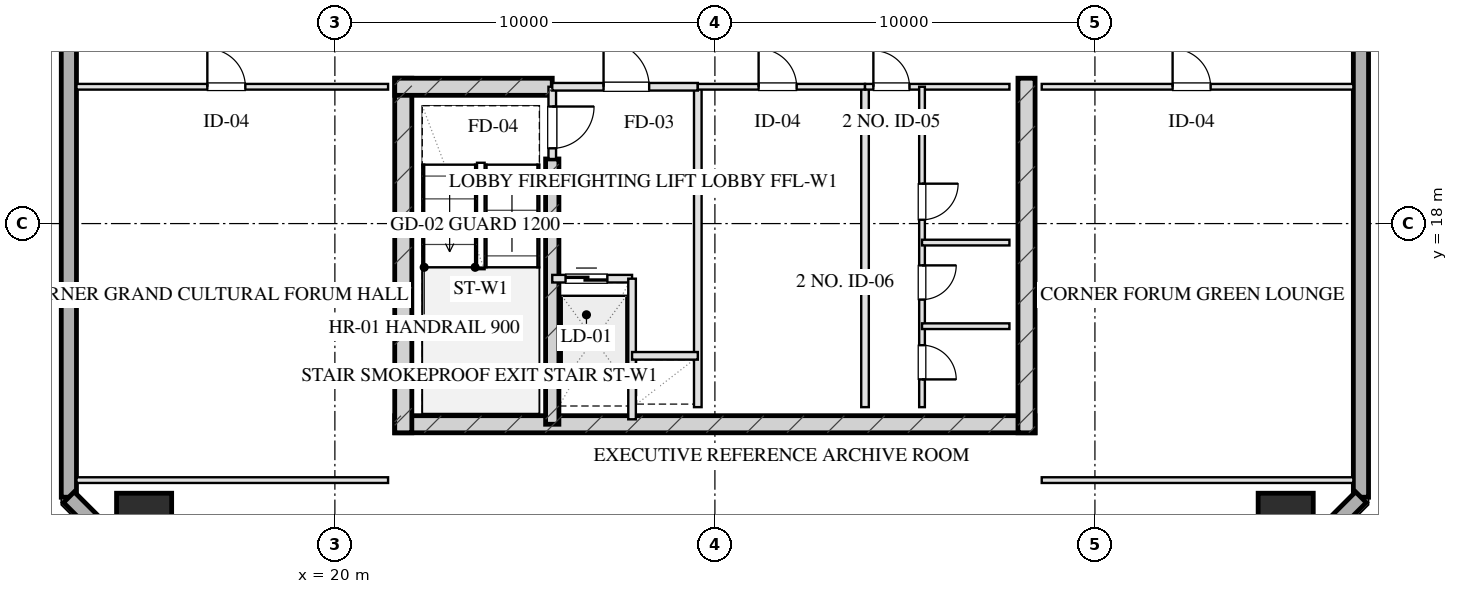
"""IFC4 building model, lengths in metres.
Left out: names, types, materials, properties, quantities, classifications, styles, units other than length and angle.
Written with IfcOpenShell. Run it as: python <this file> out.ifc"""

import sys

from ifc_helpers import new_model, si_unit, direction, frame, frame_2d, origin, origin_2d, place, context, subcontext, project, spatial, rectangle, hollow_rectangle, extrude, element, fill, save


model = new_model("IFC4")
c1 = context("Model", 3, precision=1e-05, world=origin(), true_north=direction((0.0, 1.0)))
c2 = subcontext(c1, "Body", "Model", "MODEL_VIEW")
j1 = project(units=[si_unit("LENGTHUNIT", "METRE"), si_unit("PLANEANGLEUNIT", "RADIAN")], contexts=[c1])
p1 = place(None, origin())
s1 = spatial("IfcSite", under=j1, at=p1, CompositionType="ELEMENT")
p2 = place(p1, origin())
s2 = spatial("IfcBuilding", under=s1, at=p2, CompositionType="ELEMENT")
p3 = place(p2, frame((0.0, 0.0, 205.85)))
s3 = spatial("IfcBuildingStorey", under=s2, at=p3, CompositionType="ELEMENT", Elevation=205.85)
p4 = place(p3, frame((21.575, 12.72, 0.0), z_axis=(0.0, 0.0, 1.0), x_axis=(1.0, 0.0, 0.0)))
e1 = element("IfcWall", 1, at=p4, inside=s3, PredefinedType="SHEAR", context=c2, shape_type="SweptSolid", body=[
    extrude(rectangle(XDim=16.85, YDim=0.45, at=frame_2d((8.425, 0.0))), origin(), (0.0, 0.0, 1.0), 3.45),
])
for number, where, z_axis, x_axis in (
    (2, (21.8, 21.825, 0.0), (0.0, 0.0, 1.0), (0.0, -1.0, 0.0)),
    (3, (38.2, 21.825, 0.0), (0.0, 0.0, 1.0), (0.0, -1.0, 0.0)),
):
    element("IfcWall", number, at=place(p3, frame(where, z_axis=z_axis, x_axis=x_axis)), inside=s3, PredefinedType="SHEAR", context=c2, shape_type="SweptSolid", body=[
        extrude(rectangle(XDim=9.33, YDim=0.45, at=frame_2d((4.665, 0.0))), origin(), (0.0, 0.0, 1.0), 3.45),
    ])
p5 = place(p3, frame((25.72, 19.7, 0.0), z_axis=(0.0, 0.0, 1.0), x_axis=(0.0, -1.0, 0.0)))
e4 = element("IfcWall", 4, at=p5, inside=s3, PredefinedType="SHEAR", context=c2, shape_type="SweptSolid", body=[
    extrude(rectangle(XDim=6.98, YDim=0.35, at=frame_2d((3.49, 0.0))), origin(), (0.0, 0.0, 1.0), 3.45),
])
p6 = place(p3, frame((21.575, 21.6, 0.0), z_axis=(0.0, 0.0, 1.0), x_axis=(1.0, 0.0, 0.0)))
e5 = element("IfcWall", 5, at=p6, inside=s3, PredefinedType="SHEAR", context=c2, shape_type="SweptSolid", body=[
    extrude(rectangle(XDim=4.145, YDim=0.45, at=frame_2d((2.073, 0.0))), origin(), (0.0, 0.0, 1.0), 3.45),
])
for number, where, z_axis, x_axis in (
    (6, (14.98, 10.18, 0.0), (0.0, 0.0, 1.0), (1.0, 0.0, 0.0)),
    (7, (45.02, 10.18, 0.0), (0.0, 0.0, 1.0), (1.0, 0.0, 0.0)),
):
    element("IfcColumn", number, at=place(p3, frame(where, z_axis=z_axis, x_axis=x_axis)), inside=s3, PredefinedType="COLUMN", context=c2, shape_type="SweptSolid", body=[
        extrude(hollow_rectangle(XDim=1.45, YDim=1.45, WallThickness=0.05, at=origin_2d()), origin(), (0.0, 0.0, 1.0), 3.451),
    ])
p7 = place(p3, frame((13.0, 10.8, 0.0), z_axis=(0.0, 0.0, 1.0), x_axis=(0.0, 1.0, 0.0)))
e8 = element("IfcWall", 8, at=p7, inside=s3, PredefinedType="SOLIDWALL", context=c2, shape_type="SweptSolid", body=[
    extrude(rectangle(XDim=46.4, YDim=0.4, at=frame_2d((23.2, 0.0))), origin(), (0.0, 0.0, 1.0), 2.61),
])
p8 = place(p7, frame((15.75, 0.0, 0.75)))
e9 = element("IfcOpeningElement", 9, at=p8, cuts=e8, PredefinedType="OPENING", context=c2, shape_type="SweptSolid", body=[
    extrude(rectangle(XDim=2.1, YDim=1.46, at=frame_2d((1.05, 0.73))), frame((0.0, 0.21, 0.0), z_axis=(0.0, -1.0, 0.0), x_axis=(1.0, 0.0, 0.0)), (0.0, 0.0, 1.0), 0.42),
])
p9 = place(p7, frame((19.55, 0.0, 0.75)))
e10 = element("IfcOpeningElement", 10, at=p9, cuts=e8, PredefinedType="OPENING", context=c2, shape_type="SweptSolid", body=[
    extrude(rectangle(XDim=2.1, YDim=1.46, at=frame_2d((1.05, 0.73))), frame((0.0, 0.21, 0.0), z_axis=(0.0, -1.0, 0.0), x_axis=(1.0, 0.0, 0.0)), (0.0, 0.0, 1.0), 0.42),
])
p10 = place(p7, frame((27.05, 0.0, 0.0)))
e11 = element("IfcOpeningElement", 11, at=p10, cuts=e8, PredefinedType="OPENING", context=c2, shape_type="SweptSolid", body=[
    extrude(rectangle(XDim=1.1, YDim=2.15, at=frame_2d((0.55, 1.075))), frame((0.0, 0.21, 0.0), z_axis=(0.0, -1.0, 0.0), x_axis=(1.0, 0.0, 0.0)), (0.0, 0.0, 1.0), 0.42),
])
p11 = place(p3, frame((47.0, 57.2, 0.0), z_axis=(0.0, 0.0, 1.0), x_axis=(0.0, -1.0, 0.0)))
e12 = element("IfcWall", 12, at=p11, inside=s3, PredefinedType="SOLIDWALL", context=c2, shape_type="SweptSolid", body=[
    extrude(rectangle(XDim=46.4, YDim=0.4, at=frame_2d((23.2, 0.0))), origin(), (0.0, 0.0, 1.0), 2.61),
])
p12 = place(p11, frame((28.55, 0.0, 0.75)))
e13 = element("IfcOpeningElement", 13, at=p12, cuts=e12, PredefinedType="OPENING", context=c2, shape_type="SweptSolid", body=[
    extrude(rectangle(XDim=2.1, YDim=1.46, at=frame_2d((1.05, 0.73))), frame((0.0, 0.21, 0.0), z_axis=(0.0, -1.0, 0.0), x_axis=(1.0, 0.0, 0.0)), (0.0, 0.0, 1.0), 0.42),
])
p13 = place(p11, frame((24.75, 0.0, 0.75)))
e14 = element("IfcOpeningElement", 14, at=p13, cuts=e12, PredefinedType="OPENING", context=c2, shape_type="SweptSolid", body=[
    extrude(rectangle(XDim=2.1, YDim=1.46, at=frame_2d((1.05, 0.73))), frame((0.0, 0.21, 0.0), z_axis=(0.0, -1.0, 0.0), x_axis=(1.0, 0.0, 0.0)), (0.0, 0.0, 1.0), 0.42),
])
p14 = place(p11, frame((16.667, 0.0, 0.0)))
e15 = element("IfcOpeningElement", 15, at=p14, cuts=e12, PredefinedType="OPENING", context=c2, shape_type="SweptSolid", body=[
    extrude(rectangle(XDim=1.1, YDim=2.15, at=frame_2d((0.55, 1.075))), frame((0.0, 0.21, 0.0), z_axis=(0.0, -1.0, 0.0), x_axis=(1.0, 0.0, 0.0)), (0.0, 0.0, 1.0), 0.42),
])
for number, where, z_axis, x_axis in (
    (16, (47.0, 10.8, 0.0), (0.0, 0.0, 1.0), (-0.707, -0.707, 0.0)),
    (17, (15.6, 8.2, 0.0), (0.0, 0.0, 1.0), (-0.707, 0.707, 0.0)),
):
    element("IfcWall", number, at=place(p3, frame(where, z_axis=z_axis, x_axis=x_axis)), inside=s3, PredefinedType="SOLIDWALL", context=c2, shape_type="SweptSolid", body=[
        extrude(rectangle(XDim=3.677, YDim=0.4, at=frame_2d((1.838, 0.0))), origin(), (0.0, 0.0, 1.0), 2.61),
    ])
p15 = place(p3, frame((25.72, 21.6, 0.0), z_axis=(0.0, 0.0, 1.0), x_axis=(0.0, -1.0, 0.0)))
e18 = element("IfcWall", 18, at=p15, inside=s3, PredefinedType="PARTITIONING", context=c2, shape_type="SweptSolid", body=[
    extrude(rectangle(XDim=1.9, YDim=0.2, at=frame_2d((0.95, 0.0))), origin(), (0.0, 0.0, 1.0), 3.175),
])
p16 = place(p15, frame((0.52, 0.0, 0.0)))
e19 = element("IfcOpeningElement", 19, at=p16, cuts=e18, PredefinedType="OPENING", context=c2, shape_type="SweptSolid", body=[
    extrude(rectangle(XDim=1.1, YDim=2.05, at=frame_2d((0.55, 1.025))), frame((0.0, 0.11, 0.0), z_axis=(0.0, -1.0, 0.0), x_axis=(1.0, 0.0, 0.0)), (0.0, 0.0, 1.0), 0.22),
])
p17 = place(p3, frame((29.55, 21.6, 0.0), z_axis=(0.0, 0.0, 1.0), x_axis=(0.0, -1.0, 0.0)))
e20 = element("IfcWall", 20, at=p17, inside=s3, PredefinedType="PARTITIONING", context=c2, shape_type="SweptSolid", body=[
    extrude(rectangle(XDim=8.43, YDim=0.2, at=frame_2d((4.215, 0.0))), origin(), (0.0, 0.0, 1.0), 3.175),
])
p18 = place(p3, frame((25.72, 21.6, 0.0), z_axis=(0.0, 0.0, 1.0), x_axis=(1.0, 0.0, 0.0)))
e21 = element("IfcWall", 21, at=p18, inside=s3, PredefinedType="PARTITIONING", context=c2, shape_type="SweptSolid", body=[
    extrude(rectangle(XDim=3.83, YDim=0.2, at=frame_2d((1.915, 0.0))), origin(), (0.0, 0.0, 1.0), 3.175),
])
p19 = place(p18, frame((1.35, 0.0, 0.0)))
e22 = element("IfcOpeningElement", 22, at=p19, cuts=e21, PredefinedType="OPENING", context=c2, shape_type="SweptSolid", body=[
    extrude(rectangle(XDim=1.2, YDim=2.05, at=frame_2d((0.6, 1.025))), frame((0.0, 0.11, 0.0), z_axis=(0.0, -1.0, 0.0), x_axis=(1.0, 0.0, 0.0)), (0.0, 0.0, 1.0), 0.22),
])
p20 = place(p3, frame((25.72, 16.55, 0.0), z_axis=(0.0, 0.0, 1.0), x_axis=(1.0, 0.0, 0.0)))
e23 = element("IfcWall", 23, at=p20, inside=s3, PredefinedType="PARTITIONING", context=c2, shape_type="SweptSolid", body=[
    extrude(rectangle(XDim=2.1, YDim=0.2, at=frame_2d((1.05, 0.0))), origin(), (0.0, 0.0, 1.0), 3.175),
])
p21 = place(p20, frame((0.35, 0.0, 0.0)))
e24 = element("IfcOpeningElement", 24, at=p21, cuts=e23, PredefinedType="OPENING", context=c2, shape_type="SweptSolid", body=[
    extrude(rectangle(XDim=1.1, YDim=2.05, at=frame_2d((0.55, 1.025))), frame((0.0, 0.11, 0.0), z_axis=(0.0, -1.0, 0.0), x_axis=(1.0, 0.0, 0.0)), (0.0, 0.0, 1.0), 0.22),
])
p22 = place(p3, frame((27.82, 16.55, 0.0), z_axis=(0.0, 0.0, 1.0), x_axis=(0.0, -1.0, 0.0)))
e25 = element("IfcWall", 25, at=p22, inside=s3, PredefinedType="PARTITIONING", context=c2, shape_type="SweptSolid", body=[
    extrude(rectangle(XDim=3.7, YDim=0.2, at=frame_2d((1.85, 0.0))), origin(), (0.0, 0.0, 1.0), 3.175),
])
p23 = place(p3, frame((27.82, 14.52, 0.0), z_axis=(0.0, 0.0, 1.0), x_axis=(1.0, 0.0, 0.0)))
e26 = element("IfcWall", 26, at=p23, inside=s3, PredefinedType="PARTITIONING", context=c2, shape_type="SweptSolid", body=[
    extrude(rectangle(XDim=1.73, YDim=0.2, at=frame_2d((0.865, 0.0))), origin(), (0.0, 0.0, 1.0), 3.175),
])
p24 = place(p3, frame((33.95, 21.6, 0.0), z_axis=(0.0, 0.0, 1.0), x_axis=(0.0, -1.0, 0.0)))
e27 = element("IfcWall", 27, at=p24, inside=s3, PredefinedType="PARTITIONING", context=c2, shape_type="SweptSolid", body=[
    extrude(rectangle(XDim=8.43, YDim=0.2, at=frame_2d((4.215, 0.0))), origin(), (0.0, 0.0, 1.0), 3.175),
])
p25 = place(p3, frame((29.55, 21.6, 0.0), z_axis=(0.0, 0.0, 1.0), x_axis=(1.0, 0.0, 0.0)))
e28 = element("IfcWall", 28, at=p25, inside=s3, PredefinedType="PARTITIONING", context=c2, shape_type="SweptSolid", body=[
    extrude(rectangle(XDim=4.4, YDim=0.15, at=frame_2d((2.2, 0.0))), origin(), (0.0, 0.0, 1.0), 3.175),
])
p26 = place(p25, frame((1.6, 0.0, 0.0)))
e29 = element("IfcOpeningElement", 29, at=p26, cuts=e28, PredefinedType="OPENING", context=c2, shape_type="SweptSolid", body=[
    extrude(rectangle(XDim=1.0, YDim=2.05, at=frame_2d((0.5, 1.025))), frame((0.0, 0.085, 0.0), z_axis=(0.0, -1.0, 0.0), x_axis=(1.0, 0.0, 0.0)), (0.0, 0.0, 1.0), 0.17),
])
p27 = place(p3, frame((33.95, 21.6, 0.0), z_axis=(0.0, 0.0, 1.0), x_axis=(1.0, 0.0, 0.0)))
e30 = element("IfcWall", 30, at=p27, inside=s3, PredefinedType="PARTITIONING", context=c2, shape_type="SweptSolid", body=[
    extrude(rectangle(XDim=3.8, YDim=0.15, at=frame_2d((1.9, 0.0))), origin(), (0.0, 0.0, 1.0), 3.175),
])
p28 = place(p27, frame((0.22, 0.0, 0.0)))
e31 = element("IfcOpeningElement", 31, at=p28, cuts=e30, PredefinedType="OPENING", context=c2, shape_type="SweptSolid", body=[
    extrude(rectangle(XDim=0.95, YDim=2.05, at=frame_2d((0.475, 1.025))), frame((0.0, 0.085, 0.0), z_axis=(0.0, -1.0, 0.0), x_axis=(1.0, 0.0, 0.0)), (0.0, 0.0, 1.0), 0.17),
])
p29 = place(p3, frame((35.45, 21.6, 0.0), z_axis=(0.0, 0.0, 1.0), x_axis=(0.0, -1.0, 0.0)))
e32 = element("IfcWall", 32, at=p29, inside=s3, PredefinedType="PARTITIONING", context=c2, shape_type="SweptSolid", body=[
    extrude(rectangle(XDim=8.43, YDim=0.15, at=frame_2d((4.215, 0.0))), origin(), (0.0, 0.0, 1.0), 2.815),
])
p30 = place(p29, frame((2.55, 0.0, 0.0)))
e33 = element("IfcOpeningElement", 33, at=p30, cuts=e32, PredefinedType="OPENING", context=c2, shape_type="SweptSolid", body=[
    extrude(rectangle(XDim=0.95, YDim=2.05, at=frame_2d((0.475, 1.025))), frame((0.0, 0.085, 0.0), z_axis=(0.0, -1.0, 0.0), x_axis=(1.0, 0.0, 0.0)), (0.0, 0.0, 1.0), 0.17),
])
p31 = place(p29, frame((4.7, 0.0, 0.0)))
e34 = element("IfcOpeningElement", 34, at=p31, cuts=e32, PredefinedType="OPENING", context=c2, shape_type="SweptSolid", body=[
    extrude(rectangle(XDim=0.9, YDim=2.05, at=frame_2d((0.45, 1.025))), frame((0.0, 0.085, 0.0), z_axis=(0.0, -1.0, 0.0), x_axis=(1.0, 0.0, 0.0)), (0.0, 0.0, 1.0), 0.17),
])
p32 = place(p29, frame((6.8, 0.0, 0.0)))
e35 = element("IfcOpeningElement", 35, at=p32, cuts=e32, PredefinedType="OPENING", context=c2, shape_type="SweptSolid", body=[
    extrude(rectangle(XDim=0.9, YDim=2.05, at=frame_2d((0.45, 1.025))), frame((0.0, 0.085, 0.0), z_axis=(0.0, -1.0, 0.0), x_axis=(1.0, 0.0, 0.0)), (0.0, 0.0, 1.0), 0.17),
])
for number, where, z_axis, x_axis in (
    (36, (35.45, 17.5, 0.0), (0.0, 0.0, 1.0), (1.0, 0.0, 0.0)),
    (37, (35.45, 15.3, 0.0), (0.0, 0.0, 1.0), (1.0, 0.0, 0.0)),
):
    element("IfcWall", number, at=place(p3, frame(where, z_axis=z_axis, x_axis=x_axis)), inside=s3, PredefinedType="PARTITIONING", context=c2, shape_type="SweptSolid", body=[
        extrude(rectangle(XDim=2.3, YDim=0.15, at=frame_2d((1.15, 0.0))), origin(), (0.0, 0.0, 1.0), 3.175),
    ])
p33 = place(p3, frame((13.2, 11.25, 0.0), z_axis=(0.0, 0.0, 1.0), x_axis=(1.0, 0.0, 0.0)))
e38 = element("IfcWall", 38, at=p33, inside=s3, PredefinedType="PARTITIONING", context=c2, shape_type="SweptSolid", body=[
    extrude(rectangle(XDim=8.2, YDim=0.15, at=frame_2d((4.1, 0.0))), origin(), (0.0, 0.0, 1.0), 3.175),
])
p34 = place(p3, frame((13.2, 21.6, 0.0), z_axis=(0.0, 0.0, 1.0), x_axis=(1.0, 0.0, 0.0)))
e39 = element("IfcWall", 39, at=p34, inside=s3, PredefinedType="PARTITIONING", context=c2, shape_type="SweptSolid", body=[
    extrude(rectangle(XDim=8.2, YDim=0.15, at=frame_2d((4.1, 0.0))), origin(), (0.0, 0.0, 1.0), 3.175),
])
p35 = place(p34, frame((3.444, 0.0, 0.0)))
e40 = element("IfcOpeningElement", 40, at=p35, cuts=e39, PredefinedType="OPENING", context=c2, shape_type="SweptSolid", body=[
    extrude(rectangle(XDim=1.0, YDim=2.05, at=frame_2d((0.5, 1.025))), frame((0.0, 0.085, 0.0), z_axis=(0.0, -1.0, 0.0), x_axis=(1.0, 0.0, 0.0)), (0.0, 0.0, 1.0), 0.17),
])
p36 = place(p3, frame((38.6, 11.25, 0.0), z_axis=(0.0, 0.0, 1.0), x_axis=(1.0, 0.0, 0.0)))
e41 = element("IfcWall", 41, at=p36, inside=s3, PredefinedType="PARTITIONING", context=c2, shape_type="SweptSolid", body=[
    extrude(rectangle(XDim=8.2, YDim=0.15, at=frame_2d((4.1, 0.0))), origin(), (0.0, 0.0, 1.0), 3.175),
])
p37 = place(p3, frame((38.6, 21.6, 0.0), z_axis=(0.0, 0.0, 1.0), x_axis=(1.0, 0.0, 0.0)))
e42 = element("IfcWall", 42, at=p37, inside=s3, PredefinedType="PARTITIONING", context=c2, shape_type="SweptSolid", body=[
    extrude(rectangle(XDim=8.2, YDim=0.15, at=frame_2d((4.1, 0.0))), origin(), (0.0, 0.0, 1.0), 3.175),
])
p38 = place(p37, frame((3.444, 0.0, 0.0)))
e43 = element("IfcOpeningElement", 43, at=p38, cuts=e42, PredefinedType="OPENING", context=c2, shape_type="SweptSolid", body=[
    extrude(rectangle(XDim=1.0, YDim=2.05, at=frame_2d((0.5, 1.025))), frame((0.0, 0.085, 0.0), z_axis=(0.0, -1.0, 0.0), x_axis=(1.0, 0.0, 0.0)), (0.0, 0.0, 1.0), 0.17),
])
p39 = place(p16, origin())
e44 = element("IfcDoor", 44, at=p39, inside=s3, OperationType="SINGLE_SWING_LEFT", PredefinedType="DOOR", context=c2, shape_type="SweptSolid", body=[
    extrude(rectangle(XDim=1.1, YDim=2.05, at=frame_2d((0.55, 1.025))), frame((0.0, 0.025, 0.0), z_axis=(0.0, -1.0, 0.0), x_axis=(1.0, 0.0, 0.0)), (0.0, 0.0, 1.0), 0.05),
])
fill(e19, e44)
p40 = place(p19, origin())
e45 = element("IfcDoor", 45, at=p40, inside=s3, OperationType="SINGLE_SWING_LEFT", PredefinedType="DOOR", context=c2, shape_type="SweptSolid", body=[
    extrude(rectangle(XDim=1.2, YDim=2.05, at=frame_2d((0.6, 1.025))), frame((0.0, 0.025, 0.0), z_axis=(0.0, -1.0, 0.0), x_axis=(1.0, 0.0, 0.0)), (0.0, 0.0, 1.0), 0.05),
])
fill(e22, e45)
p41 = place(p21, origin())
e46 = element("IfcDoor", 46, at=p41, inside=s3, OperationType="DOUBLE_DOOR_SLIDING", PredefinedType="DOOR", context=c2, shape_type="SweptSolid", body=[
    extrude(rectangle(XDim=1.1, YDim=2.05, at=frame_2d((0.55, 1.025))), frame((0.0, 0.025, 0.0), z_axis=(0.0, -1.0, 0.0), x_axis=(1.0, 0.0, 0.0)), (0.0, 0.0, 1.0), 0.05),
])
fill(e24, e46)
p42 = place(p26, origin())
e47 = element("IfcDoor", 47, at=p42, inside=s3, OperationType="SINGLE_SWING_LEFT", PredefinedType="DOOR", context=c2, shape_type="SweptSolid", body=[
    extrude(rectangle(XDim=1.0, YDim=2.05, at=frame_2d((0.5, 1.025))), frame((0.0, 0.025, 0.0), z_axis=(0.0, -1.0, 0.0), x_axis=(1.0, 0.0, 0.0)), (0.0, 0.0, 1.0), 0.05),
])
fill(e29, e47)
p43 = place(p28, origin())
e48 = element("IfcDoor", 48, at=p43, inside=s3, OperationType="SINGLE_SWING_LEFT", PredefinedType="DOOR", context=c2, shape_type="SweptSolid", body=[
    extrude(rectangle(XDim=0.95, YDim=2.05, at=frame_2d((0.475, 1.025))), frame((0.0, 0.025, 0.0), z_axis=(0.0, -1.0, 0.0), x_axis=(1.0, 0.0, 0.0)), (0.0, 0.0, 1.0), 0.05),
])
fill(e31, e48)
p44 = place(p30, origin())
e49 = element("IfcDoor", 49, at=p44, inside=s3, OperationType="SINGLE_SWING_LEFT", PredefinedType="DOOR", context=c2, shape_type="SweptSolid", body=[
    extrude(rectangle(XDim=0.95, YDim=2.05, at=frame_2d((0.475, 1.025))), frame((0.0, 0.025, 0.0), z_axis=(0.0, -1.0, 0.0), x_axis=(1.0, 0.0, 0.0)), (0.0, 0.0, 1.0), 0.05),
])
fill(e33, e49)
p45 = place(p31, origin())
e50 = element("IfcDoor", 50, at=p45, inside=s3, OperationType="SINGLE_SWING_LEFT", PredefinedType="DOOR", context=c2, shape_type="SweptSolid", body=[
    extrude(rectangle(XDim=0.9, YDim=2.05, at=frame_2d((0.45, 1.025))), frame((0.0, 0.025, 0.0), z_axis=(0.0, -1.0, 0.0), x_axis=(1.0, 0.0, 0.0)), (0.0, 0.0, 1.0), 0.05),
])
fill(e34, e50)
p46 = place(p32, origin())
e51 = element("IfcDoor", 51, at=p46, inside=s3, OperationType="SINGLE_SWING_RIGHT", PredefinedType="DOOR", context=c2, shape_type="SweptSolid", body=[
    extrude(rectangle(XDim=0.9, YDim=2.05, at=frame_2d((0.45, 1.025))), frame((0.0, 0.025, 0.0), z_axis=(0.0, -1.0, 0.0), x_axis=(1.0, 0.0, 0.0)), (0.0, 0.0, 1.0), 0.05),
])
fill(e35, e51)
p47 = place(p35, origin())
e52 = element("IfcDoor", 52, at=p47, inside=s3, OperationType="SINGLE_SWING_LEFT", PredefinedType="DOOR", context=c2, shape_type="SweptSolid", body=[
    extrude(rectangle(XDim=1.0, YDim=2.05, at=frame_2d((0.5, 1.025))), frame((0.0, 0.025, 0.0), z_axis=(0.0, -1.0, 0.0), x_axis=(1.0, 0.0, 0.0)), (0.0, 0.0, 1.0), 0.05),
])
fill(e40, e52)
p48 = place(p38, origin())
e53 = element("IfcDoor", 53, at=p48, inside=s3, OperationType="SINGLE_SWING_LEFT", PredefinedType="DOOR", context=c2, shape_type="SweptSolid", body=[
    extrude(rectangle(XDim=1.0, YDim=2.05, at=frame_2d((0.5, 1.025))), frame((0.0, 0.025, 0.0), z_axis=(0.0, -1.0, 0.0), x_axis=(1.0, 0.0, 0.0)), (0.0, 0.0, 1.0), 0.05),
])
fill(e43, e53)
save(model, sys.argv[1])
